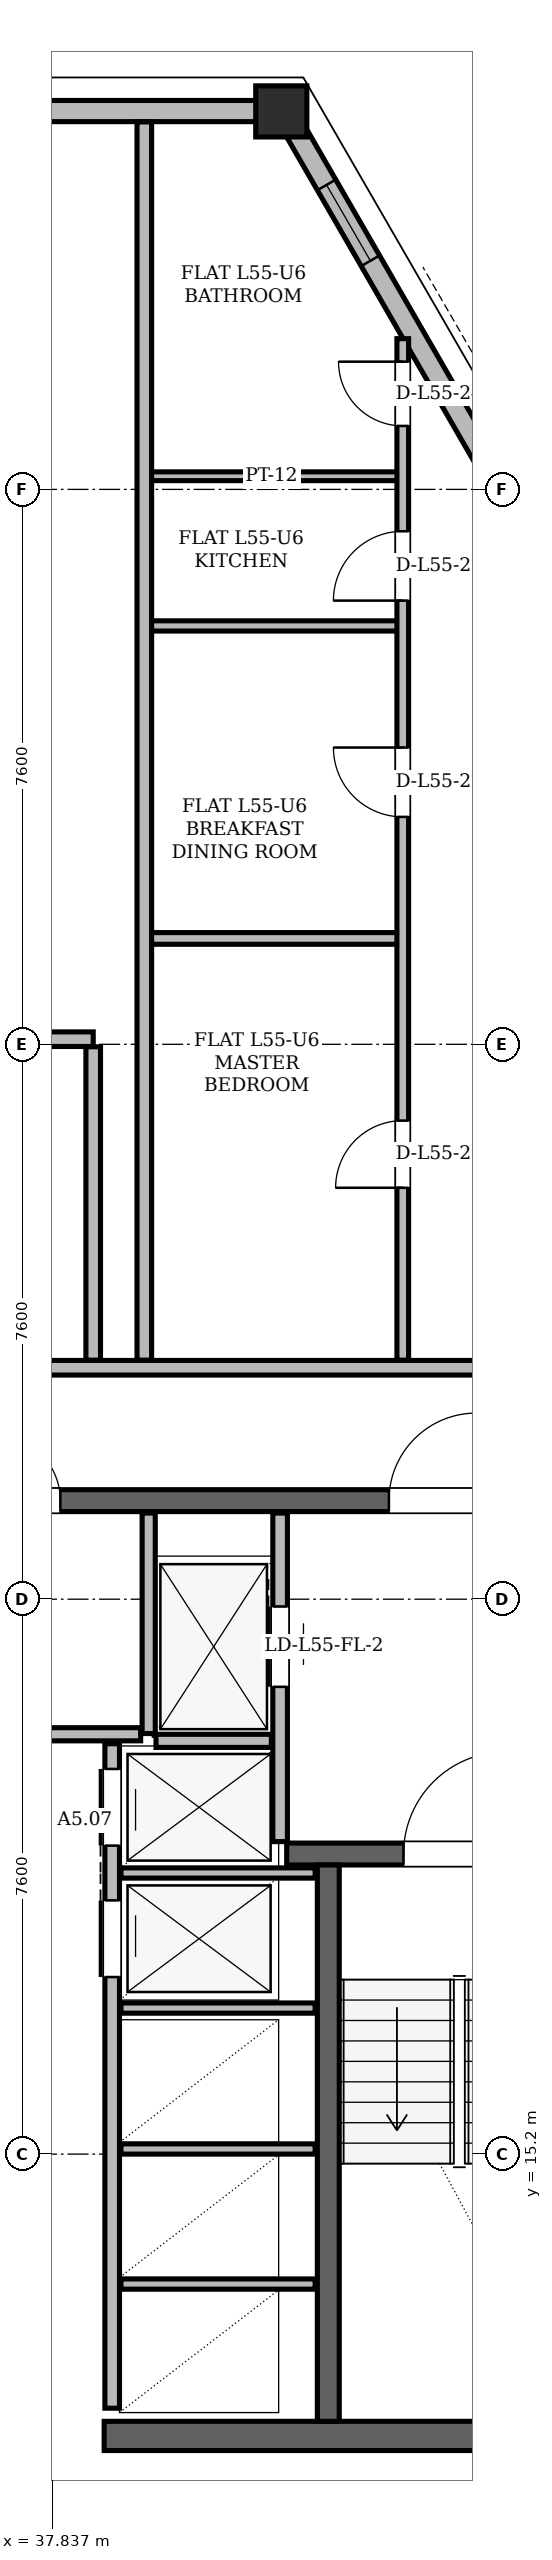
"""IFC4 building model, lengths in metres.
Left out: names, types, materials, properties, quantities, classifications, styles, units other than length and angle.
Written with IfcOpenShell. Run it as: python <this file> out.ifc"""

import sys

from ifc_helpers import new_model, si_unit, direction, frame, frame_2d, origin, origin_2d, place, context, subcontext, project, spatial, rectangle, hollow_rectangle, extrude, element, fill, save


model = new_model("IFC4")
c1 = context("Model", 3, precision=1e-05, world=origin(), true_north=direction((0.0, 1.0)))
c2 = subcontext(c1, "Body", "Model", "MODEL_VIEW")
j1 = project(units=[si_unit("LENGTHUNIT", "METRE"), si_unit("PLANEANGLEUNIT", "RADIAN")], contexts=[c1])
p1 = place(None, origin())
s1 = spatial("IfcSite", under=j1, at=p1, CompositionType="ELEMENT")
p2 = place(p1, origin())
s2 = spatial("IfcBuilding", under=s1, at=p2, CompositionType="ELEMENT")
p3 = place(p2, frame((0.0, 0.0, 209.1)))
s3 = spatial("IfcBuildingStorey", under=s2, at=p3, CompositionType="ELEMENT", Elevation=209.1)
p4 = place(p3, frame((41.012, 43.182, 0.004), z_axis=(-0.020187537135, -0.002582917209, 0.999792874491), x_axis=(0.12691156023, -0.991914036537, 0.0)))
e1 = element("IfcColumn", 1, at=p4, inside=s3, PredefinedType="COLUMN", context=c2, shape_type="SweptSolid", body=[
    extrude(hollow_rectangle(XDim=0.7, YDim=0.7, WallThickness=0.055, at=origin_2d()), origin(), (0.0, 0.0, 1.0), 3.592),
])
p5 = place(p3, frame((38.55, 11.34, 0.0), z_axis=(0.0, 0.0, 1.0), x_axis=(1.0, 0.0, 0.0)))
e2 = element("IfcWall", 2, at=p5, inside=s3, PredefinedType="SHEAR", context=c2, shape_type="SweptSolid", body=[
    extrude(rectangle(XDim=7.1, YDim=0.4, at=frame_2d((3.55, 0.0))), origin(), (0.0, 0.0, 1.0), 3.38),
])
p6 = place(p3, frame((29.65, 24.15, 0.0), z_axis=(0.0, 0.0, 1.0), x_axis=(1.0, 0.0, 0.0)))
e3 = element("IfcWall", 3, at=p6, inside=s3, PredefinedType="SHEAR", context=c2, shape_type="SweptSolid", body=[
    extrude(rectangle(XDim=15.7, YDim=0.3, at=frame_2d((7.85, 0.0))), origin(), (0.0, 0.0, 1.0), 3.38),
])
p7 = place(p6, frame((1.7, 0.0, 0.0)))
e4 = element("IfcOpeningElement", 4, at=p7, cuts=e3, PredefinedType="OPENING", context=c2, shape_type="SweptSolid", body=[
    extrude(rectangle(XDim=1.2, YDim=2.2, at=frame_2d((0.6, 1.1))), frame((0.0, 0.15, 0.0), z_axis=(0.0, -1.0, 0.0), x_axis=(1.0, 0.0, 0.0)), (0.0, 0.0, 1.0), 0.3),
])
p8 = place(p6, frame((12.8, 0.0, 0.0)))
e5 = element("IfcOpeningElement", 5, at=p8, cuts=e3, PredefinedType="OPENING", context=c2, shape_type="SweptSolid", body=[
    extrude(rectangle(XDim=1.2, YDim=2.2, at=frame_2d((0.6, 1.1))), frame((0.0, 0.15, 0.0), z_axis=(0.0, -1.0, 0.0), x_axis=(1.0, 0.0, 0.0)), (0.0, 0.0, 1.0), 0.3),
])
p9 = place(p6, frame((7.4, 0.0, 0.0)))
e6 = element("IfcOpeningElement", 6, at=p9, cuts=e3, PredefinedType="OPENING", context=c2, shape_type="SweptSolid", body=[
    extrude(rectangle(XDim=0.9, YDim=2.05, at=frame_2d((0.45, 1.025))), frame((0.0, 0.15, 0.0), z_axis=(0.0, -1.0, 0.0), x_axis=(1.0, 0.0, 0.0)), (0.0, 0.0, 1.0), 0.3),
])
p10 = place(p3, frame((41.05, 19.31, 0.0), z_axis=(0.0, 0.0, 1.0), x_axis=(1.0, 0.0, 0.0)))
e7 = element("IfcWall", 7, at=p10, inside=s3, PredefinedType="SHEAR", context=c2, shape_type="SweptSolid", body=[
    extrude(rectangle(XDim=4.01, YDim=0.3, at=frame_2d((2.005, 0.0))), origin(), (0.0, 0.0, 1.0), 3.38),
])
p11 = place(p10, frame((1.6, 0.0, 0.0)))
e8 = element("IfcOpeningElement", 8, at=p11, cuts=e7, PredefinedType="OPENING", context=c2, shape_type="SweptSolid", body=[
    extrude(rectangle(XDim=1.4, YDim=2.2, at=frame_2d((0.7, 1.1))), frame((0.0, 0.15, 0.0), z_axis=(0.0, -1.0, 0.0), x_axis=(1.0, 0.0, 0.0)), (0.0, 0.0, 1.0), 0.3),
])
p12 = place(p3, frame((41.62, 11.54, 0.0), z_axis=(0.0, 0.0, 1.0), x_axis=(0.0, 1.0, 0.0)))
e9 = element("IfcWall", 9, at=p12, inside=s3, PredefinedType="SHEAR", context=c2, shape_type="SweptSolid", body=[
    extrude(rectangle(XDim=7.62, YDim=0.3, at=frame_2d((3.81, 0.0))), origin(), (0.0, 0.0, 1.0), 3.38),
])
p13 = place(p3, frame((59.246, 11.601, 0.0), z_axis=(0.0, 0.0, 1.0), x_axis=(-0.50000139879, 0.866024596191, 0.0)))
e10 = element("IfcWall", 10, at=p13, inside=s3, PredefinedType="SOLIDWALL", context=c2, shape_type="SweptSolid", body=[
    extrude(rectangle(XDim=36.467, YDim=0.29, at=frame_2d((18.233, 0.0))), origin(), (0.0, 0.0, 1.0), 2.677),
])
p14 = place(p13, frame((6.789, 0.0, 0.0)))
e11 = element("IfcOpeningElement", 11, at=p14, cuts=e10, PredefinedType="OPENING", context=c2, shape_type="SweptSolid", body=[
    extrude(rectangle(XDim=1.5, YDim=2.2, at=frame_2d((0.75, 1.1))), frame((0.0, 0.145, 0.0), z_axis=(0.0, -1.0, 0.0), x_axis=(1.0, 0.0, 0.0)), (0.0, 0.0, 1.0), 0.29),
])
p15 = place(p13, frame((26.932, 0.0, 0.0)))
e12 = element("IfcOpeningElement", 12, at=p15, cuts=e10, PredefinedType="OPENING", context=c2, shape_type="SweptSolid", body=[
    extrude(rectangle(XDim=1.5, YDim=2.2, at=frame_2d((0.75, 1.1))), frame((0.0, 0.145, 0.0), z_axis=(0.0, -1.0, 0.0), x_axis=(1.0, 0.0, 0.0)), (0.0, 0.0, 1.0), 0.29),
])
p16 = place(p13, frame((12.324, 0.0, 0.85)))
e13 = element("IfcOpeningElement", 13, at=p16, cuts=e10, PredefinedType="OPENING", context=c2, shape_type="SweptSolid", body=[
    extrude(rectangle(XDim=1.2, YDim=1.48, at=frame_2d((0.6, 0.74))), frame((0.0, 0.145, 0.0), z_axis=(0.0, -1.0, 0.0), x_axis=(1.0, 0.0, 0.0)), (0.0, 0.0, 1.0), 0.29),
])
p17 = place(p13, frame((2.218, 0.0, 0.85)))
e14 = element("IfcOpeningElement", 14, at=p17, cuts=e10, PredefinedType="OPENING", context=c2, shape_type="SweptSolid", body=[
    extrude(rectangle(XDim=1.2, YDim=1.48, at=frame_2d((0.6, 0.74))), frame((0.0, 0.145, 0.0), z_axis=(0.0, -1.0, 0.0), x_axis=(1.0, 0.0, 0.0)), (0.0, 0.0, 1.0), 0.29),
])
p18 = place(p13, frame((17.24, 0.0, 0.85)))
e15 = element("IfcOpeningElement", 15, at=p18, cuts=e10, PredefinedType="OPENING", context=c2, shape_type="SweptSolid", body=[
    extrude(rectangle(XDim=2.6, YDim=1.717, at=frame_2d((1.3, 0.858))), frame((0.0, 0.145, 0.0), z_axis=(0.0, -1.0, 0.0), x_axis=(1.0, 0.0, 0.0)), (0.0, 0.0, 1.0), 0.29),
])
p19 = place(p13, frame((34.098, 0.0, 0.85)))
e16 = element("IfcOpeningElement", 16, at=p19, cuts=e10, PredefinedType="OPENING", context=c2, shape_type="SweptSolid", body=[
    extrude(rectangle(XDim=1.2, YDim=1.48, at=frame_2d((0.6, 0.74))), frame((0.0, 0.145, 0.0), z_axis=(0.0, -1.0, 0.0), x_axis=(1.0, 0.0, 0.0)), (0.0, 0.0, 1.0), 0.29),
])
p20 = place(p3, frame((41.012, 43.182, 0.0), z_axis=(0.0, 0.0, 1.0), x_axis=(-1.0, 0.0, 0.0)))
e17 = element("IfcWall", 17, at=p20, inside=s3, PredefinedType="SOLIDWALL", context=c2, shape_type="SweptSolid", body=[
    extrude(rectangle(XDim=7.024, YDim=0.29, at=frame_2d((3.512, 0.0))), origin(), (0.0, 0.0, 1.0), 2.677),
])
p21 = place(p3, frame((40.96, 19.48, 0.0), z_axis=(0.0, 0.0, 1.0), x_axis=(0.0, 1.0, 0.0)))
e18 = element("IfcWall", 18, at=p21, inside=s3, PredefinedType="PARTITIONING", context=c2, shape_type="SweptSolid", body=[
    extrude(rectangle(XDim=4.5, YDim=0.2, at=frame_2d((2.25, 0.0))), origin(), (0.0, 0.0, 1.0), 3.38),
])
p22 = place(p21, frame((2.12, 0.0, 0.0)))
e19 = element("IfcOpeningElement", 19, at=p22, cuts=e18, PredefinedType="OPENING", context=c2, shape_type="SweptSolid", body=[
    extrude(rectangle(XDim=1.1, YDim=2.2, at=frame_2d((0.55, 1.1))), frame((0.0, 0.1, 0.0), z_axis=(0.0, -1.0, 0.0), x_axis=(1.0, 0.0, 0.0)), (0.0, 0.0, 1.0), 0.2),
])
p23 = place(p3, frame((39.16, 20.96, 0.0), z_axis=(0.0, 0.0, 1.0), x_axis=(0.0, 1.0, 0.0)))
e20 = element("IfcWall", 20, at=p23, inside=s3, PredefinedType="PARTITIONING", context=c2, shape_type="SweptSolid", body=[
    extrude(rectangle(XDim=3.02, YDim=0.18, at=frame_2d((1.51, 0.0))), origin(), (0.0, 0.0, 1.0), 3.38),
])
p24 = place(p3, frame((39.26, 20.86, 0.0), z_axis=(0.0, 0.0, 1.0), x_axis=(1.0, 0.0, 0.0)))
e21 = element("IfcWall", 21, at=p24, inside=s3, PredefinedType="PARTITIONING", context=c2, shape_type="SweptSolid", body=[
    extrude(rectangle(XDim=1.58, YDim=0.18, at=frame_2d((0.79, 0.0))), origin(), (0.0, 0.0, 1.0), 3.38),
])
p25 = place(p3, frame((38.66, 11.72, 0.0), z_axis=(0.0, 0.0, 1.0), x_axis=(0.0, 1.0, 0.0)))
e22 = element("IfcWall", 22, at=p25, inside=s3, PredefinedType="PARTITIONING", context=c2, shape_type="SweptSolid", body=[
    extrude(rectangle(XDim=9.1, YDim=0.2, at=frame_2d((4.55, 0.0))), origin(), (0.0, 0.0, 1.0), 3.38),
])
p26 = place(p25, frame((5.905, 0.0, 0.0)))
e23 = element("IfcOpeningElement", 23, at=p26, cuts=e22, PredefinedType="OPENING", context=c2, shape_type="SweptSolid", body=[
    extrude(rectangle(XDim=1.05, YDim=2.15, at=frame_2d((0.525, 1.075))), frame((0.0, 0.1, 0.0), z_axis=(0.0, -1.0, 0.0), x_axis=(1.0, 0.0, 0.0)), (0.0, 0.0, 1.0), 0.2),
])
p27 = place(p25, frame((7.705, 0.0, 0.0)))
e24 = element("IfcOpeningElement", 24, at=p27, cuts=e22, PredefinedType="OPENING", context=c2, shape_type="SweptSolid", body=[
    extrude(rectangle(XDim=1.05, YDim=2.15, at=frame_2d((0.525, 1.075))), frame((0.0, 0.1, 0.0), z_axis=(0.0, -1.0, 0.0), x_axis=(1.0, 0.0, 0.0)), (0.0, 0.0, 1.0), 0.2),
])
for number, where, z_axis, x_axis in (
    (25, (38.78, 13.42, 0.0), (0.0, 0.0, 1.0), (1.0, 0.0, 0.0)),
    (26, (38.78, 15.27, 0.0), (0.0, 0.0, 1.0), (1.0, 0.0, 0.0)),
    (27, (38.78, 17.2, 0.0), (0.0, 0.0, 1.0), (1.0, 0.0, 0.0)),
    (28, (38.78, 19.05, 0.0), (0.0, 0.0, 1.0), (1.0, 0.0, 0.0)),
):
    element("IfcWall", number, at=place(p3, frame(where, z_axis=z_axis, x_axis=x_axis)), inside=s3, PredefinedType="PARTITIONING", context=c2, shape_type="SweptSolid", body=[
        extrude(rectangle(XDim=2.66, YDim=0.14, at=frame_2d((1.33, 0.0))), origin(), (0.0, 0.0, 1.0), 3.38),
    ])
p28 = place(p3, frame((35.95, 20.95, 0.0), z_axis=(0.0, 0.0, 1.0), x_axis=(1.0, 0.0, 0.0)))
e29 = element("IfcWall", 29, at=p28, inside=s3, PredefinedType="PARTITIONING", context=c2, shape_type="SweptSolid", body=[
    extrude(rectangle(XDim=3.1, YDim=0.18, at=frame_2d((1.55, 0.0))), origin(), (0.0, 0.0, 1.0), 3.38),
])
p29 = place(p3, frame((25.6, 25.97, 0.0), z_axis=(0.0, 0.0, 1.0), x_axis=(1.0, 0.0, 0.0)))
e30 = element("IfcWall", 30, at=p29, inside=s3, PredefinedType="PARTITIONING", context=c2, shape_type="SweptSolid", body=[
    extrude(rectangle(XDim=21.85, YDim=0.2, at=frame_2d((10.925, 0.0))), origin(), (0.0, 0.0, 1.0), 2.913),
])
p30 = place(p29, frame((9.75, 0.0, 0.0)))
e31 = element("IfcOpeningElement", 31, at=p30, cuts=e30, PredefinedType="OPENING", context=c2, shape_type="SweptSolid", body=[
    extrude(rectangle(XDim=1.3, YDim=2.2, at=frame_2d((0.65, 1.1))), frame((0.0, 0.1, 0.0), z_axis=(0.0, -1.0, 0.0), x_axis=(1.0, 0.0, 0.0)), (0.0, 0.0, 1.0), 0.2),
])
p31 = place(p29, frame((18.922, 0.0, 0.0)))
e32 = element("IfcOpeningElement", 32, at=p31, cuts=e30, PredefinedType="OPENING", context=c2, shape_type="SweptSolid", body=[
    extrude(rectangle(XDim=1.0, YDim=2.18, at=frame_2d((0.5, 1.09))), frame((0.0, 0.1, 0.0), z_axis=(0.0, -1.0, 0.0), x_axis=(1.0, 0.0, 0.0)), (0.0, 0.0, 1.0), 0.2),
])
p32 = place(p3, frame((33.6, 30.47, 0.0), z_axis=(0.0, 0.0, 1.0), x_axis=(1.0, 0.0, 0.0)))
e33 = element("IfcWall", 33, at=p32, inside=s3, PredefinedType="PARTITIONING", context=c2, shape_type="SweptSolid", body=[
    extrude(rectangle(XDim=4.8, YDim=0.2, at=frame_2d((2.4, 0.0))), origin(), (0.0, 0.0, 1.0), 3.38),
])
p33 = place(p3, frame((39.05, 31.85, 0.0), z_axis=(0.0, 0.0, 1.0), x_axis=(1.0, 0.0, 0.0)))
e34 = element("IfcWall", 34, at=p33, inside=s3, PredefinedType="PARTITIONING", context=c2, shape_type="SweptSolid", body=[
    extrude(rectangle(XDim=3.586, YDim=0.16, at=frame_2d((1.793, 0.0))), origin(), (0.0, 0.0, 1.0), 3.38),
])
p34 = place(p3, frame((39.05, 36.13, 0.0), z_axis=(0.0, 0.0, 1.0), x_axis=(1.0, 0.0, 0.0)))
e35 = element("IfcWall", 35, at=p34, inside=s3, PredefinedType="PARTITIONING", context=c2, shape_type="SweptSolid", body=[
    extrude(rectangle(XDim=3.586, YDim=0.14, at=frame_2d((1.793, 0.0))), origin(), (0.0, 0.0, 1.0), 3.38),
])
p35 = place(p3, frame((39.05, 38.18, 0.0), z_axis=(0.0, 0.0, 1.0), x_axis=(1.0, 0.0, 0.0)))
e36 = element("IfcWall", 36, at=p35, inside=s3, PredefinedType="PARTITIONING", context=c2, shape_type="SweptSolid", body=[
    extrude(rectangle(XDim=3.586, YDim=0.12, at=frame_2d((1.793, 0.0))), origin(), (0.0, 0.0, 1.0), 2.913),
])
p36 = place(p3, frame((38.4, 26.074, 0.0), z_axis=(0.0, 0.0, 1.0), x_axis=(0.0, 1.0, 0.0)))
e37 = element("IfcWall", 37, at=p36, inside=s3, PredefinedType="PARTITIONING", context=c2, shape_type="SweptSolid", body=[
    extrude(rectangle(XDim=4.292, YDim=0.2, at=frame_2d((2.146, 0.0))), origin(), (0.0, 0.0, 1.0), 3.38),
])
p37 = place(p3, frame((39.1, 26.074, 0.0), z_axis=(0.0, 0.0, 1.0), x_axis=(0.0, 1.0, 0.0)))
e38 = element("IfcWall", 38, at=p37, inside=s3, PredefinedType="PARTITIONING", context=c2, shape_type="SweptSolid", body=[
    extrude(rectangle(XDim=16.959, YDim=0.2, at=frame_2d((8.479, 0.0))), origin(), (0.0, 0.0, 1.0), 3.38),
])
p38 = place(p3, frame((42.64, 26.074, 0.0), z_axis=(0.0, 0.0, 1.0), x_axis=(0.0, 1.0, 0.0)))
e39 = element("IfcWall", 39, at=p38, inside=s3, PredefinedType="PARTITIONING", context=c2, shape_type="SweptSolid", body=[
    extrude(rectangle(XDim=13.991, YDim=0.16, at=frame_2d((6.995, 0.0))), origin(), (0.0, 0.0, 1.0), 2.913),
])
p39 = place(p38, frame((2.361, 0.0, 0.0)))
e40 = element("IfcOpeningElement", 40, at=p39, cuts=e39, PredefinedType="OPENING", context=c2, shape_type="SweptSolid", body=[
    extrude(rectangle(XDim=0.92, YDim=2.12, at=frame_2d((0.46, 1.06))), frame((0.0, 0.08, 0.0), z_axis=(0.0, -1.0, 0.0), x_axis=(1.0, 0.0, 0.0)), (0.0, 0.0, 1.0), 0.16),
])
p40 = place(p38, frame((7.441, 0.0, 0.0)))
e41 = element("IfcOpeningElement", 41, at=p40, cuts=e39, PredefinedType="OPENING", context=c2, shape_type="SweptSolid", body=[
    extrude(rectangle(XDim=0.95, YDim=2.1, at=frame_2d((0.475, 1.05))), frame((0.0, 0.08, 0.0), z_axis=(0.0, -1.0, 0.0), x_axis=(1.0, 0.0, 0.0)), (0.0, 0.0, 1.0), 0.16),
])
p41 = place(p38, frame((10.403, 0.0, 0.0)))
e42 = element("IfcOpeningElement", 42, at=p41, cuts=e39, PredefinedType="OPENING", context=c2, shape_type="SweptSolid", body=[
    extrude(rectangle(XDim=0.95, YDim=2.1, at=frame_2d((0.475, 1.05))), frame((0.0, 0.08, 0.0), z_axis=(0.0, -1.0, 0.0), x_axis=(1.0, 0.0, 0.0)), (0.0, 0.0, 1.0), 0.16),
])
p42 = place(p38, frame((12.795, 0.0, 0.0)))
e43 = element("IfcOpeningElement", 43, at=p42, cuts=e39, PredefinedType="OPENING", context=c2, shape_type="SweptSolid", body=[
    extrude(rectangle(XDim=0.88, YDim=2.08, at=frame_2d((0.44, 1.04))), frame((0.0, 0.08, 0.0), z_axis=(0.0, -1.0, 0.0), x_axis=(1.0, 0.0, 0.0)), (0.0, 0.0, 1.0), 0.16),
])
p43 = place(p19, origin())
e44 = element("IfcWindow", 44, at=p43, inside=s3, PartitioningType="SINGLE_PANEL", PredefinedType="WINDOW", context=c2, shape_type="SweptSolid", body=[
    extrude(rectangle(XDim=1.2, YDim=1.48, at=frame_2d((0.6, 0.74))), frame((0.0, 0.03, 0.0), z_axis=(0.0, -1.0, 0.0), x_axis=(1.0, 0.0, 0.0)), (0.0, 0.0, 1.0), 0.06),
])
fill(e16, e44)
p44 = place(p22, origin())
e45 = element("IfcDoor", 45, at=p44, inside=s3, OperationType="SLIDING_TO_RIGHT", PredefinedType="DOOR", context=c2, shape_type="SweptSolid", body=[
    extrude(rectangle(XDim=1.1, YDim=2.2, at=frame_2d((0.55, 1.1))), frame((0.0, 0.025, 0.0), z_axis=(0.0, -1.0, 0.0), x_axis=(1.0, 0.0, 0.0)), (0.0, 0.0, 1.0), 0.05),
])
fill(e19, e45)
p45 = place(p26, origin())
e46 = element("IfcDoor", 46, at=p45, inside=s3, OperationType="SLIDING_TO_RIGHT", PredefinedType="DOOR", context=c2, shape_type="SweptSolid", body=[
    extrude(rectangle(XDim=1.05, YDim=2.15, at=frame_2d((0.525, 1.075))), frame((0.0, 0.025, 0.0), z_axis=(0.0, -1.0, 0.0), x_axis=(1.0, 0.0, 0.0)), (0.0, 0.0, 1.0), 0.05),
])
fill(e23, e46)
p46 = place(p27, origin())
e47 = element("IfcDoor", 47, at=p46, inside=s3, OperationType="SLIDING_TO_LEFT", PredefinedType="DOOR", context=c2, shape_type="SweptSolid", body=[
    extrude(rectangle(XDim=1.05, YDim=2.15, at=frame_2d((0.525, 1.075))), frame((0.0, 0.025, 0.0), z_axis=(0.0, -1.0, 0.0), x_axis=(1.0, 0.0, 0.0)), (0.0, 0.0, 1.0), 0.05),
])
fill(e24, e47)
p47 = place(p11, origin())
e48 = element("IfcDoor", 48, at=p47, inside=s3, OperationType="SINGLE_SWING_RIGHT", PredefinedType="DOOR", context=c2, shape_type="SweptSolid", body=[
    extrude(rectangle(XDim=1.4, YDim=2.2, at=frame_2d((0.7, 1.1))), frame((0.0, 0.025, 0.0), z_axis=(0.0, -1.0, 0.0), x_axis=(1.0, 0.0, 0.0)), (0.0, 0.0, 1.0), 0.05),
])
fill(e8, e48)
p48 = place(p8, origin())
e49 = element("IfcDoor", 49, at=p48, inside=s3, OperationType="SINGLE_SWING_RIGHT", PredefinedType="DOOR", context=c2, shape_type="SweptSolid", body=[
    extrude(rectangle(XDim=1.2, YDim=2.2, at=frame_2d((0.6, 1.1))), frame((0.0, 0.025, 0.0), z_axis=(0.0, -1.0, 0.0), x_axis=(1.0, 0.0, 0.0)), (0.0, 0.0, 1.0), 0.05),
])
fill(e5, e49)
p49 = place(p9, origin())
e50 = element("IfcDoor", 50, at=p49, inside=s3, OperationType="SINGLE_SWING_LEFT", PredefinedType="DOOR", context=c2, shape_type="SweptSolid", body=[
    extrude(rectangle(XDim=0.9, YDim=2.05, at=frame_2d((0.45, 1.025))), frame((0.0, 0.025, 0.0), z_axis=(0.0, -1.0, 0.0), x_axis=(1.0, 0.0, 0.0)), (0.0, 0.0, 1.0), 0.05),
])
fill(e6, e50)
p50 = place(p39, origin())
e51 = element("IfcDoor", 51, at=p50, inside=s3, OperationType="SINGLE_SWING_LEFT", PredefinedType="DOOR", context=c2, shape_type="SweptSolid", body=[
    extrude(rectangle(XDim=0.92, YDim=2.12, at=frame_2d((0.46, 1.06))), frame((0.0, 0.025, 0.0), z_axis=(0.0, -1.0, 0.0), x_axis=(1.0, 0.0, 0.0)), (0.0, 0.0, 1.0), 0.05),
])
fill(e40, e51)
p51 = place(p40, origin())
e52 = element("IfcDoor", 52, at=p51, inside=s3, OperationType="SINGLE_SWING_RIGHT", PredefinedType="DOOR", context=c2, shape_type="SweptSolid", body=[
    extrude(rectangle(XDim=0.95, YDim=2.1, at=frame_2d((0.475, 1.05))), frame((0.0, 0.025, 0.0), z_axis=(0.0, -1.0, 0.0), x_axis=(1.0, 0.0, 0.0)), (0.0, 0.0, 1.0), 0.05),
])
fill(e41, e52)
p52 = place(p41, origin())
e53 = element("IfcDoor", 53, at=p52, inside=s3, OperationType="SINGLE_SWING_LEFT", PredefinedType="DOOR", context=c2, shape_type="SweptSolid", body=[
    extrude(rectangle(XDim=0.95, YDim=2.1, at=frame_2d((0.475, 1.05))), frame((0.0, 0.025, 0.0), z_axis=(0.0, -1.0, 0.0), x_axis=(1.0, 0.0, 0.0)), (0.0, 0.0, 1.0), 0.05),
])
fill(e42, e53)
p53 = place(p42, origin())
e54 = element("IfcDoor", 54, at=p53, inside=s3, OperationType="SINGLE_SWING_RIGHT", PredefinedType="DOOR", context=c2, shape_type="SweptSolid", body=[
    extrude(rectangle(XDim=0.88, YDim=2.08, at=frame_2d((0.44, 1.04))), frame((0.0, 0.025, 0.0), z_axis=(0.0, -1.0, 0.0), x_axis=(1.0, 0.0, 0.0)), (0.0, 0.0, 1.0), 0.05),
])
fill(e43, e54)
save(model, sys.argv[1])
